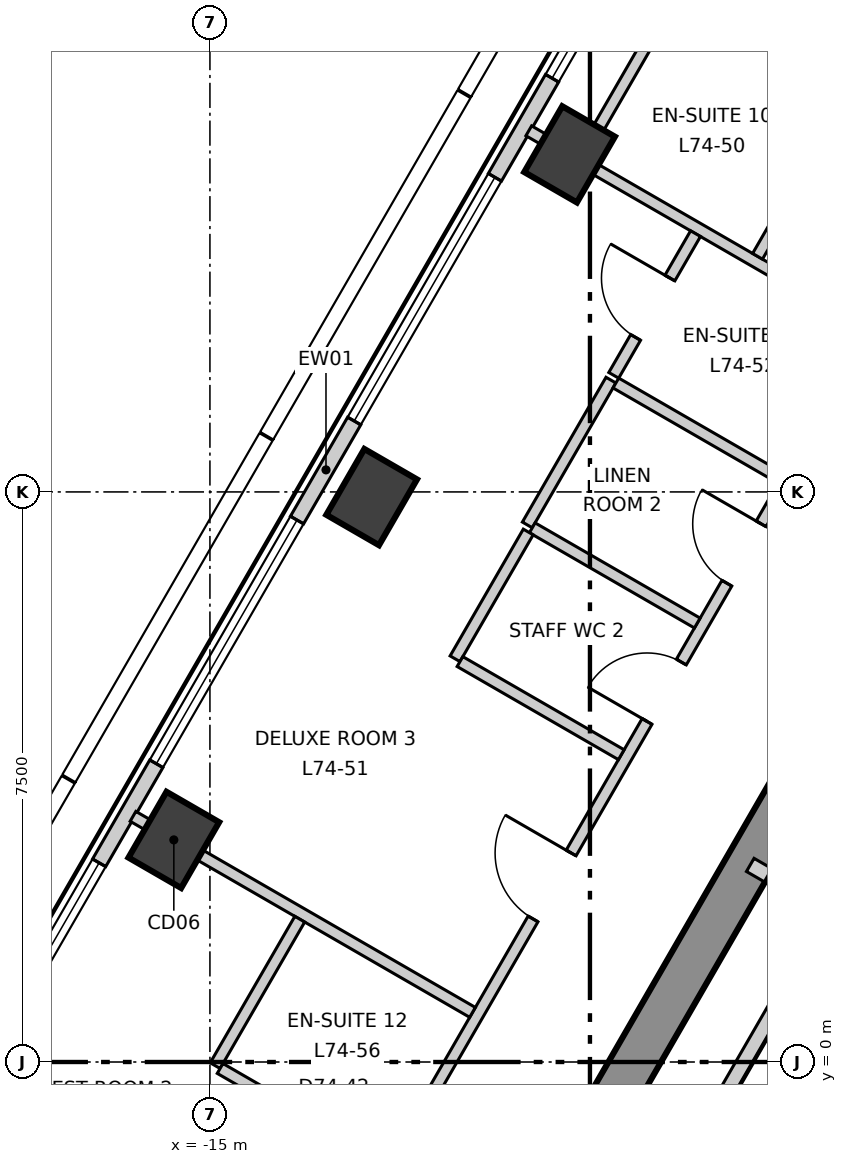
"""IFC4 building model, lengths in metres.
Left out: names, types, materials, properties, quantities, classifications, styles, units other than length and angle.
Written with IfcOpenShell. Run it as: python <this file> out.ifc"""

import sys

from ifc_helpers import new_model, si_unit, direction, frame, frame_2d, origin, origin_2d, place, context, subcontext, project, spatial, polyline, rectangle, outline, extrude, element, fill, save


model = new_model("IFC4")
c1 = context("Model", 3, precision=1e-05, world=origin(), true_north=direction((0.0, 1.0)))
c2 = subcontext(c1, "Body", "Model", "MODEL_VIEW")
j1 = project(units=[si_unit("LENGTHUNIT", "METRE"), si_unit("PLANEANGLEUNIT", "RADIAN")], contexts=[c1])
p1 = place(None, origin())
s1 = spatial("IfcSite", under=j1, at=p1, CompositionType="ELEMENT")
p2 = place(p1, origin())
s2 = spatial("IfcBuilding", under=s1, at=p2, CompositionType="ELEMENT")
p3 = place(p2, frame((0.0, 0.0, 311.5)))
s3 = spatial("IfcBuildingStorey", under=s2, at=p3, CompositionType="ELEMENT", Elevation=311.5)
p4 = place(p3, frame((-1.732, 13.3, -0.3), z_axis=(0.0, 0.0, 1.0), x_axis=(-0.500000539815, -0.866025092122, 0.0)))
e1 = element("IfcWall", 1, at=p4, inside=s3, PredefinedType="SHEAR", context=c2, shape_type="SweptSolid", body=[
    extrude(outline(polyline([(-0.173, -0.3), (1.795, -0.3), (3.763, -0.3), (5.732, -0.3), (7.7, -0.3), (9.668, -0.301), (11.637, -0.301), (13.605, -0.301), (15.573, -0.301), (17.542, -0.301), (19.51, -0.301), (21.478, -0.301), (21.131, 0.3), (19.226, 0.3), (17.321, 0.3), (15.415, 0.3), (13.51, 0.3), (11.605, 0.3), (9.699, 0.3), (7.794, 0.3), (5.889, 0.3), (3.984, 0.3), (2.078, 0.3), (0.173, 0.3), (-0.173, -0.3)])), origin(), (0.0, 0.0, 1.0), 3.6),
])
p5 = place(p4, frame((10.102, 0.0, 0.3)))
e2 = element("IfcOpeningElement", 2, at=p5, cuts=e1, PredefinedType="OPENING", context=c2, shape_type="SweptSolid", body=[
    extrude(rectangle(XDim=1.1, YDim=2.1, at=frame_2d((0.55, 1.05))), frame((0.0, 0.31, 0.0), z_axis=(0.0, -1.0, 0.0), x_axis=(1.0, 0.0, 0.0)), (0.0, 0.0, 1.0), 0.621),
])
p6 = place(p4, frame((16.378, 0.0, 0.3)))
e3 = element("IfcOpeningElement", 3, at=p6, cuts=e1, PredefinedType="OPENING", context=c2, shape_type="SweptSolid", body=[
    extrude(rectangle(XDim=0.9, YDim=2.1, at=frame_2d((0.45, 1.05))), frame((0.0, 0.31, 0.0), z_axis=(0.0, -1.0, 0.0), x_axis=(1.0, 0.0, 0.0)), (0.0, 0.0, 1.0), 0.621),
])
p7 = place(p4, frame((4.106, 0.0, 0.3)))
e4 = element("IfcOpeningElement", 4, at=p7, cuts=e1, PredefinedType="OPENING", context=c2, shape_type="SweptSolid", body=[
    extrude(rectangle(XDim=1.0, YDim=2.1, at=frame_2d((0.5, 1.05))), frame((0.0, 0.31, 0.0), z_axis=(0.0, -1.0, 0.0), x_axis=(1.0, 0.0, 0.0)), (0.0, 0.0, 1.0), 0.621),
])
for number, where, z_axis, x_axis in (
    (5, (-10.268, 11.941, -0.3), (0.0, 0.0, 1.0), (0.5, 0.866, 0.0)),
    (6, (-12.872, 7.432, -0.3), (0.0, 0.0, 1.0), (0.5, 0.866, 0.0)),
    (7, (-15.475, 2.922, -0.3), (0.0, 0.0, 1.0), (0.5, 0.866, 0.0)),
):
    element("IfcColumn", number, at=place(p3, frame(where, z_axis=z_axis, x_axis=x_axis)), inside=s3, PredefinedType="COLUMN", context=c2, shape_type="SweptSolid", body=[
        extrude(rectangle(XDim=1.0, YDim=0.8, at=origin_2d()), origin(), (0.0, 0.0, 1.0), 3.6),
    ])
p8 = place(p3, frame((-2.412, 26.948, 0.0), z_axis=(0.0, 0.0, 1.0), x_axis=(-0.500002044679, -0.866024223285, 0.0)))
e8 = element("IfcWall", 8, at=p8, inside=s3, PredefinedType="ELEMENTEDWALL", context=c2, shape_type="SweptSolid", body=[
    extrude(rectangle(XDim=44.243, YDim=0.2, at=frame_2d((22.122, 0.0))), origin(), (0.0, 0.0, 1.0), 3.3),
])
p9 = place(p8, frame((2.056, 0.0, 0.9)))
e9 = element("IfcOpeningElement", 9, at=p9, cuts=e8, PredefinedType="OPENING", context=c2, shape_type="SweptSolid", body=[
    extrude(rectangle(XDim=3.7, YDim=2.2, at=frame_2d((1.85, 1.1))), frame((0.0, 0.11, 0.0), z_axis=(0.0, -1.0, 0.0), x_axis=(1.0, 0.0, 0.0)), (0.0, 0.0, 1.0), 0.22),
])
p10 = place(p8, frame((7.263, 0.0, 0.9)))
e10 = element("IfcOpeningElement", 10, at=p10, cuts=e8, PredefinedType="OPENING", context=c2, shape_type="SweptSolid", body=[
    extrude(rectangle(XDim=3.7, YDim=2.2, at=frame_2d((1.85, 1.1))), frame((0.0, 0.11, 0.0), z_axis=(0.0, -1.0, 0.0), x_axis=(1.0, 0.0, 0.0)), (0.0, 0.0, 1.0), 0.22),
])
p11 = place(p8, frame((12.471, 0.0, 0.9)))
e11 = element("IfcOpeningElement", 11, at=p11, cuts=e8, PredefinedType="OPENING", context=c2, shape_type="SweptSolid", body=[
    extrude(rectangle(XDim=3.7, YDim=2.2, at=frame_2d((1.85, 1.1))), frame((0.0, 0.11, 0.0), z_axis=(0.0, -1.0, 0.0), x_axis=(1.0, 0.0, 0.0)), (0.0, 0.0, 1.0), 0.22),
])
p12 = place(p8, frame((17.678, 0.0, 0.9)))
e12 = element("IfcOpeningElement", 12, at=p12, cuts=e8, PredefinedType="OPENING", context=c2, shape_type="SweptSolid", body=[
    extrude(rectangle(XDim=3.7, YDim=2.2, at=frame_2d((1.85, 1.1))), frame((0.0, 0.11, 0.0), z_axis=(0.0, -1.0, 0.0), x_axis=(1.0, 0.0, 0.0)), (0.0, 0.0, 1.0), 0.22),
])
p13 = place(p8, frame((22.885, 0.0, 0.9)))
e13 = element("IfcOpeningElement", 13, at=p13, cuts=e8, PredefinedType="OPENING", context=c2, shape_type="SweptSolid", body=[
    extrude(rectangle(XDim=3.7, YDim=2.2, at=frame_2d((1.85, 1.1))), frame((0.0, 0.11, 0.0), z_axis=(0.0, -1.0, 0.0), x_axis=(1.0, 0.0, 0.0)), (0.0, 0.0, 1.0), 0.22),
])
p14 = place(p8, frame((28.092, 0.0, 0.9)))
e14 = element("IfcOpeningElement", 14, at=p14, cuts=e8, PredefinedType="OPENING", context=c2, shape_type="SweptSolid", body=[
    extrude(rectangle(XDim=3.7, YDim=2.2, at=frame_2d((1.85, 1.1))), frame((0.0, 0.11, 0.0), z_axis=(0.0, -1.0, 0.0), x_axis=(1.0, 0.0, 0.0)), (0.0, 0.0, 1.0), 0.22),
])
p15 = place(p8, frame((33.3, 0.0, 0.9)))
e15 = element("IfcOpeningElement", 15, at=p15, cuts=e8, PredefinedType="OPENING", context=c2, shape_type="SweptSolid", body=[
    extrude(rectangle(XDim=3.7, YDim=2.2, at=frame_2d((1.85, 1.1))), frame((0.0, 0.11, 0.0), z_axis=(0.0, -1.0, 0.0), x_axis=(1.0, 0.0, 0.0)), (0.0, 0.0, 1.0), 0.22),
])
p16 = place(p8, frame((38.507, 0.0, 0.9)))
e16 = element("IfcOpeningElement", 16, at=p16, cuts=e8, PredefinedType="OPENING", context=c2, shape_type="SweptSolid", body=[
    extrude(rectangle(XDim=3.7, YDim=2.2, at=frame_2d((1.85, 1.1))), frame((0.0, 0.11, 0.0), z_axis=(0.0, -1.0, 0.0), x_axis=(1.0, 0.0, 0.0)), (0.0, 0.0, 1.0), 0.22),
])
p17 = place(p3, frame((-17.678, -10.12, 0.0), z_axis=(0.0, 0.0, 1.0), x_axis=(0.49998824015, 0.86603219323, 0.0)))
e17 = element("IfcWall", 17, at=p17, inside=s3, PredefinedType="PARTITIONING", context=c2, shape_type="SweptSolid", body=[
    extrude(rectangle(XDim=35.357, YDim=0.15, at=frame_2d((17.678, 0.0))), origin(), (0.0, 0.0, 1.0), 3.3),
])
p18 = place(p17, frame((28.607, 0.0, 0.0)))
e18 = element("IfcOpeningElement", 18, at=p18, cuts=e17, PredefinedType="OPENING", context=c2, shape_type="SweptSolid", body=[
    extrude(rectangle(XDim=1.0, YDim=2.1, at=frame_2d((0.5, 1.05))), frame((0.0, 0.085, 0.0), z_axis=(0.0, -1.0, 0.0), x_axis=(1.0, 0.0, 0.0)), (0.0, 0.0, 1.0), 0.17),
])
p19 = place(p17, frame((13.86, 0.0, 0.0)))
e19 = element("IfcOpeningElement", 19, at=p19, cuts=e17, PredefinedType="OPENING", context=c2, shape_type="SweptSolid", body=[
    extrude(rectangle(XDim=1.0, YDim=2.1, at=frame_2d((0.5, 1.05))), frame((0.0, 0.085, 0.0), z_axis=(0.0, -1.0, 0.0), x_axis=(1.0, 0.0, 0.0)), (0.0, 0.0, 1.0), 0.17),
])
p20 = place(p17, frame((18.96, 0.0, 0.0)))
e20 = element("IfcOpeningElement", 20, at=p20, cuts=e17, PredefinedType="OPENING", context=c2, shape_type="SweptSolid", body=[
    extrude(rectangle(XDim=0.9, YDim=2.1, at=frame_2d((0.45, 1.05))), frame((0.0, 0.085, 0.0), z_axis=(0.0, -1.0, 0.0), x_axis=(1.0, 0.0, 0.0)), (0.0, 0.0, 1.0), 0.17),
])
p21 = place(p17, frame((16.86, 0.0, 0.0)))
e21 = element("IfcOpeningElement", 21, at=p21, cuts=e17, PredefinedType="OPENING", context=c2, shape_type="SweptSolid", body=[
    extrude(rectangle(XDim=0.9, YDim=2.1, at=frame_2d((0.45, 1.05))), frame((0.0, 0.085, 0.0), z_axis=(0.0, -1.0, 0.0), x_axis=(1.0, 0.0, 0.0)), (0.0, 0.0, 1.0), 0.17),
])
p22 = place(p17, frame((8.146, 0.0, 0.0)))
e22 = element("IfcOpeningElement", 22, at=p22, cuts=e17, PredefinedType="OPENING", context=c2, shape_type="SweptSolid", body=[
    extrude(rectangle(XDim=1.0, YDim=2.1, at=frame_2d((0.5, 1.05))), frame((0.0, 0.085, 0.0), z_axis=(0.0, -1.0, 0.0), x_axis=(1.0, 0.0, 0.0)), (0.0, 0.0, 1.0), 0.17),
])
p23 = place(p17, frame((3.038, 0.0, 0.0)))
e23 = element("IfcOpeningElement", 23, at=p23, cuts=e17, PredefinedType="OPENING", context=c2, shape_type="SweptSolid", body=[
    extrude(rectangle(XDim=1.0, YDim=2.1, at=frame_2d((0.5, 1.05))), frame((0.0, 0.085, 0.0), z_axis=(0.0, -1.0, 0.0), x_axis=(1.0, 0.0, 0.0)), (0.0, 0.0, 1.0), 0.17),
])
for number, where, z_axis, x_axis in (
    (24, (-16.012, 3.232, 0.0), (0.0, 0.0, 1.0), (0.866, -0.5, 0.0)),
    (25, (-10.805, 12.251, 0.0), (0.0, 0.0, 1.0), (0.866, -0.5, 0.0)),
):
    element("IfcWall", number, at=place(p3, frame(where, z_axis=z_axis, x_axis=x_axis)), inside=s3, PredefinedType="PARTITIONING", context=c2, shape_type="SweptSolid", body=[
        extrude(rectangle(XDim=5.158, YDim=0.15, at=frame_2d((2.579, 0.0))), origin(), (0.0, 0.0, 1.0), 3.3),
    ])
p24 = place(p3, frame((-10.824, 7.066, 0.0), z_axis=(0.0, 0.0, 1.0), x_axis=(0.499994660107, 0.866028486751, 0.0)))
e26 = element("IfcWall", 26, at=p24, inside=s3, PredefinedType="PARTITIONING", context=c2, shape_type="SweptSolid", body=[
    extrude(rectangle(XDim=2.2, YDim=0.15, at=frame_2d((1.1, 0.0))), origin(), (0.0, 0.0, 1.0), 3.3),
])
p25 = place(p3, frame((-10.759, 7.028, 0.0), z_axis=(0.0, 0.0, 1.0), x_axis=(0.866083422639, -0.499899494929, 0.0)))
e27 = element("IfcWall", 27, at=p25, inside=s3, PredefinedType="PARTITIONING", context=c2, shape_type="SweptSolid", body=[
    extrude(rectangle(XDim=2.507, YDim=0.15, at=frame_2d((1.253, 0.0))), origin(), (0.0, 0.0, 1.0), 3.3),
])
p26 = place(p3, frame((-11.775, 5.305, 0.0), z_axis=(0.0, 0.0, 1.0), x_axis=(0.49995654735, 0.86605048973, 0.0)))
e28 = element("IfcWall", 28, at=p26, inside=s3, PredefinedType="PARTITIONING", context=c2, shape_type="SweptSolid", body=[
    extrude(rectangle(XDim=1.926, YDim=0.15, at=frame_2d((0.963, 0.0))), origin(), (0.0, 0.0, 1.0), 3.3),
])
p27 = place(p3, frame((-11.71, 5.268, 0.0), z_axis=(0.0, 0.0, 1.0), x_axis=(0.8660395779, -0.499975448907, 0.0)))
e29 = element("IfcWall", 29, at=p27, inside=s3, PredefinedType="PARTITIONING", context=c2, shape_type="SweptSolid", body=[
    extrude(rectangle(XDim=2.45, YDim=0.15, at=frame_2d((1.225, 0.0))), origin(), (0.0, 0.0, 1.0), 3.3),
])
p28 = place(p3, frame((-9.659, 8.933, 0.0), z_axis=(0.0, 0.0, 1.0), x_axis=(0.866059082011, -0.499941663064, 0.0)))
e30 = element("IfcWall", 30, at=p28, inside=s3, PredefinedType="PARTITIONING", context=c2, shape_type="SweptSolid", body=[
    extrude(rectangle(XDim=2.507, YDim=0.15, at=frame_2d((1.253, 0.0))), origin(), (0.0, 0.0, 1.0), 3.3),
])
p29 = place(p3, frame((-10.095, 11.928, 0.0), z_axis=(0.0, 0.0, 1.0), x_axis=(0.499956887143, 0.866050293573, 0.0)))
e31 = element("IfcWall", 31, at=p29, inside=s3, PredefinedType="PARTITIONING", context=c2, shape_type="SweptSolid", body=[
    extrude(rectangle(XDim=2.524, YDim=0.15, at=frame_2d((1.262, 0.0))), origin(), (0.0, 0.0, 1.0), 2.6),
])
p30 = place(p3, frame((-7.795, 10.6, 0.0), z_axis=(0.0, 0.0, 1.0), x_axis=(0.50028887667, 0.865858556509, 0.0)))
e32 = element("IfcWall", 32, at=p30, inside=s3, PredefinedType="PARTITIONING", context=c2, shape_type="SweptSolid", body=[
    extrude(rectangle(XDim=2.524, YDim=0.15, at=frame_2d((1.262, 0.0))), origin(), (0.0, 0.0, 1.0), 3.3),
])
p31 = place(p3, frame((-14.931, -0.048, 0.0), z_axis=(0.0, 0.0, 1.0), x_axis=(0.500080171303, 0.865979111913, 0.0)))
e33 = element("IfcWall", 33, at=p31, inside=s3, PredefinedType="PARTITIONING", context=c2, shape_type="SweptSolid", body=[
    extrude(rectangle(XDim=2.225, YDim=0.15, at=frame_2d((1.113, 0.0))), origin(), (0.0, 0.0, 1.0), 3.3),
])
p32 = place(p3, frame((-9.687, 9.034, 0.0), z_axis=(0.0, 0.0, 1.0), x_axis=(0.499909024581, 0.866077922096, 0.0)))
e34 = element("IfcWall", 34, at=p32, inside=s3, PredefinedType="PARTITIONING", context=c2, shape_type="SweptSolid", body=[
    extrude(rectangle(XDim=2.152, YDim=0.15, at=frame_2d((1.076, 0.0))), origin(), (0.0, 0.0, 1.0), 3.3),
])
p33 = place(p32, frame((0.577, 0.0, 0.0)))
e35 = element("IfcOpeningElement", 35, at=p33, cuts=e34, PredefinedType="OPENING", context=c2, shape_type="SweptSolid", body=[
    extrude(rectangle(XDim=0.9, YDim=2.1, at=frame_2d((0.45, 1.05))), frame((0.0, 0.085, 0.0), z_axis=(0.0, -1.0, 0.0), x_axis=(1.0, 0.0, 0.0)), (0.0, 0.0, 1.0), 0.17),
])
p34 = place(p3, frame((-14.866, -0.085, 0.0), z_axis=(0.0, 0.0, 1.0), x_axis=(0.865890381195, -0.500233793095, 0.0)))
e36 = element("IfcWall", 36, at=p34, inside=s3, PredefinedType="PARTITIONING", context=c2, shape_type="SweptSolid", body=[
    extrude(rectangle(XDim=2.507, YDim=0.15, at=frame_2d((1.253, 0.0))), origin(), (0.0, 0.0, 1.0), 3.3),
])
p35 = place(p34, frame((0.832, 0.0, 0.0)))
e37 = element("IfcOpeningElement", 37, at=p35, cuts=e36, PredefinedType="OPENING", context=c2, shape_type="SweptSolid", body=[
    extrude(rectangle(XDim=0.9, YDim=2.1, at=frame_2d((0.45, 1.05))), frame((0.0, 0.085, 0.0), z_axis=(0.0, -1.0, 0.0), x_axis=(1.0, 0.0, 0.0)), (0.0, 0.0, 1.0), 0.17),
])
p36 = place(p3, frame((-8.768, 14.077, 0.0), z_axis=(0.0, 0.0, 1.0), x_axis=(0.866125586781, -0.4998264378, 0.0)))
e38 = element("IfcWall", 38, at=p36, inside=s3, PredefinedType="PARTITIONING", context=c2, shape_type="SweptSolid", body=[
    extrude(rectangle(XDim=2.507, YDim=0.15, at=frame_2d((1.253, 0.0))), origin(), (0.0, 0.0, 1.0), 3.3),
])
p37 = place(p36, frame((0.775, 0.0, 0.0)))
e39 = element("IfcOpeningElement", 39, at=p37, cuts=e38, PredefinedType="OPENING", context=c2, shape_type="SweptSolid", body=[
    extrude(rectangle(XDim=0.9, YDim=2.1, at=frame_2d((0.45, 1.05))), frame((0.0, 0.085, 0.0), z_axis=(0.0, -1.0, 0.0), x_axis=(1.0, 0.0, 0.0)), (0.0, 0.0, 1.0), 0.17),
])
p38 = place(p3, frame((-8.326, -0.62, 0.0), z_axis=(0.0, 0.0, 1.0), x_axis=(0.500023687443, 0.866011727401, 0.0)))
e40 = element("IfcWall", 40, at=p38, inside=s3, PredefinedType="SOLIDWALL", context=c2, shape_type="SweptSolid", body=[
    extrude(rectangle(XDim=2.9, YDim=0.2, at=frame_2d((1.45, 0.0))), origin(), (0.0, 0.0, 1.0), 3.3),
])
p39 = place(p3, frame((-7.891, 2.593, 0.0), z_axis=(0.0, 0.0, 1.0), x_axis=(0.866070917804, -0.499921159118, 0.0)))
e41 = element("IfcWall", 41, at=p39, inside=s3, PredefinedType="SOLIDWALL", context=c2, shape_type="SweptSolid", body=[
    extrude(rectangle(XDim=3.333, YDim=0.2, at=frame_2d((1.666, 0.0))), origin(), (0.0, 0.0, 1.0), 3.3),
])
p40 = place(p39, frame((1.73, 0.0, 0.0)))
e42 = element("IfcOpeningElement", 42, at=p40, cuts=e41, PredefinedType="OPENING", context=c2, shape_type="SweptSolid", body=[
    extrude(rectangle(XDim=1.1, YDim=2.1, at=frame_2d((0.55, 1.05))), frame((0.0, 0.11, 0.0), z_axis=(0.0, -1.0, 0.0), x_axis=(1.0, 0.0, 0.0)), (0.0, 0.0, 1.0), 0.22),
])
p41 = place(p11, origin())
e43 = element("IfcWindow", 43, at=p41, inside=s3, PartitioningType="SINGLE_PANEL", PredefinedType="WINDOW", context=c2, shape_type="SweptSolid", body=[
    extrude(rectangle(XDim=3.7, YDim=2.2, at=frame_2d((1.85, 1.1))), frame((0.0, 0.03, 0.0), z_axis=(0.0, -1.0, 0.0), x_axis=(1.0, 0.0, 0.0)), (0.0, 0.0, 1.0), 0.06),
])
fill(e11, e43)
p42 = place(p12, origin())
e44 = element("IfcWindow", 44, at=p42, inside=s3, PartitioningType="SINGLE_PANEL", PredefinedType="WINDOW", context=c2, shape_type="SweptSolid", body=[
    extrude(rectangle(XDim=3.7, YDim=2.2, at=frame_2d((1.85, 1.1))), frame((0.0, 0.03, 0.0), z_axis=(0.0, -1.0, 0.0), x_axis=(1.0, 0.0, 0.0)), (0.0, 0.0, 1.0), 0.06),
])
fill(e12, e44)
p43 = place(p13, origin())
e45 = element("IfcWindow", 45, at=p43, inside=s3, PartitioningType="SINGLE_PANEL", PredefinedType="WINDOW", context=c2, shape_type="SweptSolid", body=[
    extrude(rectangle(XDim=3.7, YDim=2.2, at=frame_2d((1.85, 1.1))), frame((0.0, 0.03, 0.0), z_axis=(0.0, -1.0, 0.0), x_axis=(1.0, 0.0, 0.0)), (0.0, 0.0, 1.0), 0.06),
])
fill(e13, e45)
p44 = place(p14, origin())
e46 = element("IfcWindow", 46, at=p44, inside=s3, PartitioningType="SINGLE_PANEL", PredefinedType="WINDOW", context=c2, shape_type="SweptSolid", body=[
    extrude(rectangle(XDim=3.7, YDim=2.2, at=frame_2d((1.85, 1.1))), frame((0.0, 0.03, 0.0), z_axis=(0.0, -1.0, 0.0), x_axis=(1.0, 0.0, 0.0)), (0.0, 0.0, 1.0), 0.06),
])
fill(e14, e46)
p45 = place(p37, origin())
e47 = element("IfcDoor", 47, at=p45, inside=s3, OperationType="SINGLE_SWING_RIGHT", PredefinedType="DOOR", context=c2, shape_type="SweptSolid", body=[
    extrude(rectangle(XDim=0.9, YDim=2.1, at=frame_2d((0.45, 1.05))), frame((0.0, 0.025, 0.0), z_axis=(0.0, -1.0, 0.0), x_axis=(1.0, 0.0, 0.0)), (0.0, 0.0, 1.0), 0.05),
])
fill(e39, e47)
p46 = place(p19, origin())
e48 = element("IfcDoor", 48, at=p46, inside=s3, OperationType="SINGLE_SWING_LEFT", PredefinedType="DOOR", context=c2, shape_type="SweptSolid", body=[
    extrude(rectangle(XDim=1.0, YDim=2.1, at=frame_2d((0.5, 1.05))), frame((0.0, 0.025, 0.0), z_axis=(0.0, -1.0, 0.0), x_axis=(1.0, 0.0, 0.0)), (0.0, 0.0, 1.0), 0.05),
])
fill(e19, e48)
p47 = place(p33, origin())
e49 = element("IfcDoor", 49, at=p47, inside=s3, OperationType="SINGLE_SWING_LEFT", PredefinedType="DOOR", context=c2, shape_type="SweptSolid", body=[
    extrude(rectangle(XDim=0.9, YDim=2.1, at=frame_2d((0.45, 1.05))), frame((0.0, 0.025, 0.0), z_axis=(0.0, -1.0, 0.0), x_axis=(1.0, 0.0, 0.0)), (0.0, 0.0, 1.0), 0.05),
])
fill(e35, e49)
p48 = place(p20, origin())
e50 = element("IfcDoor", 50, at=p48, inside=s3, OperationType="SINGLE_SWING_LEFT", PredefinedType="DOOR", context=c2, shape_type="SweptSolid", body=[
    extrude(rectangle(XDim=0.9, YDim=2.1, at=frame_2d((0.45, 1.05))), frame((0.0, 0.025, 0.0), z_axis=(0.0, -1.0, 0.0), x_axis=(1.0, 0.0, 0.0)), (0.0, 0.0, 1.0), 0.05),
])
fill(e20, e50)
p49 = place(p21, origin())
e51 = element("IfcDoor", 51, at=p49, inside=s3, OperationType="SINGLE_SWING_RIGHT", PredefinedType="DOOR", context=c2, shape_type="SweptSolid", body=[
    extrude(rectangle(XDim=0.9, YDim=2.1, at=frame_2d((0.45, 1.05))), frame((0.0, 0.025, 0.0), z_axis=(0.0, -1.0, 0.0), x_axis=(1.0, 0.0, 0.0)), (0.0, 0.0, 1.0), 0.05),
])
fill(e21, e51)
save(model, sys.argv[1])
